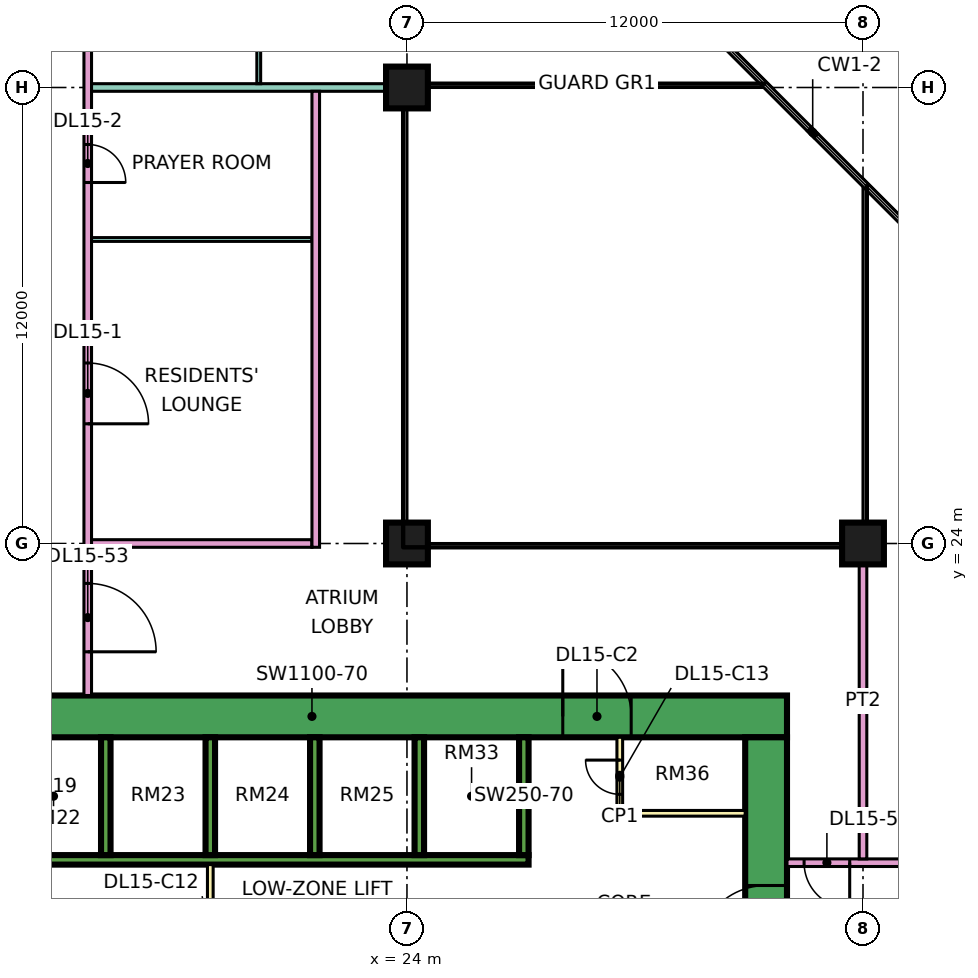
"""IFC4 building model, lengths in metres.
Left out: names, types, materials, properties, quantities, classifications, styles, units other than length and angle.
Written with IfcOpenShell. Run it as: python <this file> out.ifc"""

import sys

from ifc_helpers import new_model, si_unit, direction, frame, frame_2d, origin, origin_2d, place, context, subcontext, project, spatial, rectangle, extrude, element, fill, save


model = new_model("IFC4")
c1 = context("Model", 3, precision=1e-05, world=origin(), true_north=direction((0.0, 1.0)))
c2 = subcontext(c1, "Body", "Model", "MODEL_VIEW")
j1 = project(units=[si_unit("LENGTHUNIT", "METRE"), si_unit("PLANEANGLEUNIT", "RADIAN")], contexts=[c1])
p1 = place(None, origin())
s1 = spatial("IfcSite", under=j1, at=p1, CompositionType="ELEMENT")
p2 = place(p1, origin())
s2 = spatial("IfcBuilding", under=s1, at=p2, CompositionType="ELEMENT")
p3 = place(p2, frame((0.0, 0.0, 71.4)))
s3 = spatial("IfcBuildingStorey", under=s2, at=p3, CompositionType="ELEMENT", Elevation=71.4)
for number, where, z_axis, x_axis in (
    (1, (24.0, 24.0, 0.0), (0.0, 0.0, 1.0), (1.0, 0.0, 0.0)),
    (2, (24.0, 36.0, 0.0), (0.0, 0.0, 1.0), (1.0, 0.0, 0.0)),
    (3, (36.0, 24.0, 0.0), (0.0, 0.0, 1.0), (1.0, 0.0, 0.0)),
):
    element("IfcColumn", number, at=place(p3, frame(where, z_axis=z_axis, x_axis=x_axis)), inside=s3, PredefinedType="COLUMN", context=c2, shape_type="SweptSolid", body=[
        extrude(rectangle(XDim=1.1, YDim=1.1, at=origin_2d()), origin(), (0.0, 0.0, 1.0), 3.75),
    ])
p4 = place(p3, frame((9.0, 19.45, 0.0), z_axis=(0.0, 0.0, 1.0), x_axis=(1.0, 0.0, 0.0)))
e4 = element("IfcWall", 4, at=p4, inside=s3, PredefinedType="SHEAR", context=c2, shape_type="SweptSolid", body=[
    extrude(rectangle(XDim=25.0, YDim=1.1, at=frame_2d((12.5, 0.0))), origin(), (0.0, 0.0, 1.0), 3.75),
])
p5 = place(p4, frame((19.1, 0.0, 0.0)))
e5 = element("IfcOpeningElement", 5, at=p5, cuts=e4, PredefinedType="OPENING", context=c2, shape_type="SweptSolid", body=[
    extrude(rectangle(XDim=1.8, YDim=2.4, at=frame_2d((0.9, 1.2))), frame((0.0, 0.56, 0.0), z_axis=(0.0, -1.0, 0.0), x_axis=(1.0, 0.0, 0.0)), (0.0, 0.0, 1.0), 1.12),
])
p6 = place(p3, frame((33.45, 8.1, 0.0), z_axis=(0.0, 0.0, 1.0), x_axis=(0.0, 1.0, 0.0)))
e6 = element("IfcWall", 6, at=p6, inside=s3, PredefinedType="SHEAR", context=c2, shape_type="SweptSolid", body=[
    extrude(rectangle(XDim=10.8, YDim=1.1, at=frame_2d((5.4, 0.0))), origin(), (0.0, 0.0, 1.0), 3.75),
])
p7 = place(p6, frame((5.1, 0.0, 0.0)))
e7 = element("IfcOpeningElement", 7, at=p7, cuts=e6, PredefinedType="OPENING", context=c2, shape_type="SweptSolid", body=[
    extrude(rectangle(XDim=1.8, YDim=2.4, at=frame_2d((0.9, 1.2))), frame((0.0, 0.56, 0.0), z_axis=(0.0, -1.0, 0.0), x_axis=(1.0, 0.0, 0.0)), (0.0, 0.0, 1.0), 1.12),
])
p8 = place(p3, frame((13.45, 15.675, 0.0), z_axis=(0.0, 0.0, 1.0), x_axis=(1.0, 0.0, 0.0)))
e8 = element("IfcWall", 8, at=p8, inside=s3, PredefinedType="SHEAR", context=c2, shape_type="SweptSolid", body=[
    extrude(rectangle(XDim=13.75, YDim=0.25, at=frame_2d((6.875, 0.0))), origin(), (0.0, 0.0, 1.0), 3.75),
])
for number, where, z_axis, x_axis in (
    (9, (16.075, 15.8, 0.0), (0.0, 0.0, 1.0), (0.0, 1.0, 0.0)),
    (10, (18.825, 15.8, 0.0), (0.0, 0.0, 1.0), (0.0, 1.0, 0.0)),
    (11, (21.575, 15.8, 0.0), (0.0, 0.0, 1.0), (0.0, 1.0, 0.0)),
    (12, (24.325, 15.8, 0.0), (0.0, 0.0, 1.0), (0.0, 1.0, 0.0)),
    (13, (27.075, 15.8, 0.0), (0.0, 0.0, 1.0), (0.0, 1.0, 0.0)),
):
    element("IfcWall", number, at=place(p3, frame(where, z_axis=z_axis, x_axis=x_axis)), inside=s3, PredefinedType="SHEAR", context=c2, shape_type="SweptSolid", body=[
        extrude(rectangle(XDim=3.1, YDim=0.25, at=frame_2d((1.55, 0.0))), origin(), (0.0, 0.0, 1.0), 3.75),
    ])
p9 = place(p3, frame((18.825, 11.45, 0.0), z_axis=(0.0, 0.0, 1.0), x_axis=(0.0, 1.0, 0.0)))
e14 = element("IfcWall", 14, at=p9, inside=s3, PredefinedType="PARTITIONING", context=c2, shape_type="SweptSolid", body=[
    extrude(rectangle(XDim=4.1, YDim=0.15, at=frame_2d((2.05, 0.0))), origin(), (0.0, 0.0, 1.0), 3.35),
])
p10 = place(p9, frame((1.15, 0.0, 0.0)))
e15 = element("IfcOpeningElement", 15, at=p10, cuts=e14, PredefinedType="OPENING", context=c2, shape_type="SweptSolid", body=[
    extrude(rectangle(XDim=1.8, YDim=2.4, at=frame_2d((0.9, 1.2))), frame((0.0, 0.085, 0.0), z_axis=(0.0, -1.0, 0.0), x_axis=(1.0, 0.0, 0.0)), (0.0, 0.0, 1.0), 0.17),
])
p11 = place(p3, frame((29.6, 16.9, 0.0), z_axis=(0.0, 0.0, 1.0), x_axis=(0.0, 1.0, 0.0)))
e16 = element("IfcWall", 16, at=p11, inside=s3, PredefinedType="PARTITIONING", context=c2, shape_type="SweptSolid", body=[
    extrude(rectangle(XDim=2.0, YDim=0.15, at=frame_2d((1.0, 0.0))), origin(), (0.0, 0.0, 1.0), 3.35),
])
p12 = place(p11, frame((0.5, 0.0, 0.0)))
e17 = element("IfcOpeningElement", 17, at=p12, cuts=e16, PredefinedType="OPENING", context=c2, shape_type="SweptSolid", body=[
    extrude(rectangle(XDim=0.9, YDim=2.1, at=frame_2d((0.45, 1.05))), frame((0.0, 0.085, 0.0), z_axis=(0.0, -1.0, 0.0), x_axis=(1.0, 0.0, 0.0)), (0.0, 0.0, 1.0), 0.17),
])
p13 = place(p3, frame((29.6, 16.9, 0.0), z_axis=(0.0, 0.0, 1.0), x_axis=(1.0, 0.0, 0.0)))
e18 = element("IfcWall", 18, at=p13, inside=s3, PredefinedType="PARTITIONING", context=c2, shape_type="SweptSolid", body=[
    extrude(rectangle(XDim=3.3, YDim=0.15, at=frame_2d((1.65, 0.0))), origin(), (0.0, 0.0, 1.0), 3.35),
])
p14 = place(p3, frame((15.6, 20.0, 0.0), z_axis=(0.0, 0.0, 1.0), x_axis=(0.0, 1.0, 0.0)))
e19 = element("IfcWall", 19, at=p14, inside=s3, PredefinedType="PARTITIONING", context=c2, shape_type="SweptSolid", body=[
    extrude(rectangle(XDim=27.775, YDim=0.2, at=frame_2d((13.887, 0.0))), origin(), (0.0, 0.0, 1.0), 3.35),
])
p15 = place(p14, frame((7.15, 0.0, 0.0)))
e20 = element("IfcOpeningElement", 20, at=p15, cuts=e19, PredefinedType="OPENING", context=c2, shape_type="SweptSolid", body=[
    extrude(rectangle(XDim=1.6, YDim=2.1, at=frame_2d((0.8, 1.05))), frame((0.0, 0.11, 0.0), z_axis=(0.0, -1.0, 0.0), x_axis=(1.0, 0.0, 0.0)), (0.0, 0.0, 1.0), 0.22),
])
p16 = place(p14, frame((13.5, 0.0, 0.0)))
e21 = element("IfcOpeningElement", 21, at=p16, cuts=e19, PredefinedType="OPENING", context=c2, shape_type="SweptSolid", body=[
    extrude(rectangle(XDim=1.0, YDim=2.1, at=frame_2d((0.5, 1.05))), frame((0.0, 0.11, 0.0), z_axis=(0.0, -1.0, 0.0), x_axis=(1.0, 0.0, 0.0)), (0.0, 0.0, 1.0), 0.22),
])
p17 = place(p14, frame((17.35, 0.0, 0.0)))
e22 = element("IfcOpeningElement", 22, at=p17, cuts=e19, PredefinedType="OPENING", context=c2, shape_type="SweptSolid", body=[
    extrude(rectangle(XDim=1.0, YDim=2.1, at=frame_2d((0.5, 1.05))), frame((0.0, 0.11, 0.0), z_axis=(0.0, -1.0, 0.0), x_axis=(1.0, 0.0, 0.0)), (0.0, 0.0, 1.0), 0.22),
])
p18 = place(p14, frame((1.15, 0.0, 0.0)))
e23 = element("IfcOpeningElement", 23, at=p18, cuts=e19, PredefinedType="OPENING", context=c2, shape_type="SweptSolid", body=[
    extrude(rectangle(XDim=1.8, YDim=2.1, at=frame_2d((0.9, 1.05))), frame((0.0, 0.11, 0.0), z_axis=(0.0, -1.0, 0.0), x_axis=(1.0, 0.0, 0.0)), (0.0, 0.0, 1.0), 0.22),
])
p19 = place(p14, frame((25.9, 0.0, 0.0)))
e24 = element("IfcOpeningElement", 24, at=p19, cuts=e19, PredefinedType="OPENING", context=c2, shape_type="SweptSolid", body=[
    extrude(rectangle(XDim=1.0, YDim=2.1, at=frame_2d((0.5, 1.05))), frame((0.0, 0.11, 0.0), z_axis=(0.0, -1.0, 0.0), x_axis=(1.0, 0.0, 0.0)), (0.0, 0.0, 1.0), 0.22),
])
p20 = place(p3, frame((15.7, 24.0, 0.0), z_axis=(0.0, 0.0, 1.0), x_axis=(1.0, 0.0, 0.0)))
e25 = element("IfcWall", 25, at=p20, inside=s3, PredefinedType="PARTITIONING", context=c2, shape_type="SweptSolid", body=[
    extrude(rectangle(XDim=5.8, YDim=0.2, at=frame_2d((2.9, 0.0))), origin(), (0.0, 0.0, 1.0), 3.35),
])
p21 = place(p3, frame((15.7, 32.0, 0.0), z_axis=(0.0, 0.0, 1.0), x_axis=(1.0, 0.0, 0.0)))
e26 = element("IfcWall", 26, at=p21, inside=s3, PredefinedType="PARTITIONING", context=c2, shape_type="SweptSolid", body=[
    extrude(rectangle(XDim=5.8, YDim=0.1, at=frame_2d((2.9, 0.0))), origin(), (0.0, 0.0, 1.0), 3.35),
])
p22 = place(p3, frame((15.7, 36.0, 0.0), z_axis=(0.0, 0.0, 1.0), x_axis=(1.0, 0.0, 0.0)))
e27 = element("IfcWall", 27, at=p22, inside=s3, PredefinedType="PARTITIONING", context=c2, shape_type="SweptSolid", body=[
    extrude(rectangle(XDim=8.3, YDim=0.2, at=frame_2d((4.15, 0.0))), origin(), (0.0, 0.0, 1.0), 3.35),
])
p23 = place(p3, frame((20.1, 36.1, 0.0), z_axis=(0.0, 0.0, 1.0), x_axis=(0.0, 1.0, 0.0)))
e28 = element("IfcWall", 28, at=p23, inside=s3, PredefinedType="PARTITIONING", context=c2, shape_type="SweptSolid", body=[
    extrude(rectangle(XDim=2.85, YDim=0.1, at=frame_2d((1.425, 0.0))), origin(), (0.0, 0.0, 1.0), 3.35),
])
p24 = place(p23, frame((0.95, 0.0, 0.0)))
e29 = element("IfcOpeningElement", 29, at=p24, cuts=e28, PredefinedType="OPENING", context=c2, shape_type="SweptSolid", body=[
    extrude(rectangle(XDim=0.9, YDim=2.1, at=frame_2d((0.45, 1.05))), frame((0.0, 0.06, 0.0), z_axis=(0.0, -1.0, 0.0), x_axis=(1.0, 0.0, 0.0)), (0.0, 0.0, 1.0), 0.12),
])
p25 = place(p3, frame((21.6, 23.9, 0.0), z_axis=(0.0, 0.0, 1.0), x_axis=(0.0, 1.0, 0.0)))
e30 = element("IfcWall", 30, at=p25, inside=s3, PredefinedType="PARTITIONING", context=c2, shape_type="SweptSolid", body=[
    extrude(rectangle(XDim=12.0, YDim=0.2, at=frame_2d((6.0, 0.0))), origin(), (0.0, 0.0, 1.0), 3.35),
])
p26 = place(p3, frame((34.0, 15.6, 0.0), z_axis=(0.0, 0.0, 1.0), x_axis=(1.0, 0.0, 0.0)))
e31 = element("IfcWall", 31, at=p26, inside=s3, PredefinedType="PARTITIONING", context=c2, shape_type="SweptSolid", body=[
    extrude(rectangle(XDim=10.35, YDim=0.2, at=frame_2d((5.175, 0.0))), origin(), (0.0, 0.0, 1.0), 3.35),
])
p27 = place(p26, frame((5.6, 0.0, 0.0)))
e32 = element("IfcOpeningElement", 32, at=p27, cuts=e31, PredefinedType="OPENING", context=c2, shape_type="SweptSolid", body=[
    extrude(rectangle(XDim=1.0, YDim=2.1, at=frame_2d((0.5, 1.05))), frame((0.0, 0.11, 0.0), z_axis=(0.0, -1.0, 0.0), x_axis=(1.0, 0.0, 0.0)), (0.0, 0.0, 1.0), 0.22),
])
p28 = place(p26, frame((0.45, 0.0, 0.0)))
e33 = element("IfcOpeningElement", 33, at=p28, cuts=e31, PredefinedType="OPENING", context=c2, shape_type="SweptSolid", body=[
    extrude(rectangle(XDim=1.2, YDim=2.1, at=frame_2d((0.6, 1.05))), frame((0.0, 0.11, 0.0), z_axis=(0.0, -1.0, 0.0), x_axis=(1.0, 0.0, 0.0)), (0.0, 0.0, 1.0), 0.22),
])
p29 = place(p3, frame((36.0, 15.7, 0.0), z_axis=(0.0, 0.0, 1.0), x_axis=(0.0, 1.0, 0.0)))
e34 = element("IfcWall", 34, at=p29, inside=s3, PredefinedType="PARTITIONING", context=c2, shape_type="SweptSolid", body=[
    extrude(rectangle(XDim=8.3, YDim=0.2, at=frame_2d((4.15, 0.0))), origin(), (0.0, 0.0, 1.0), 3.35),
])
p30 = place(p7, origin())
e35 = element("IfcDoor", 35, at=p30, inside=s3, OperationType="DOUBLE_DOOR_SINGLE_SWING", PredefinedType="DOOR", context=c2, shape_type="SweptSolid", body=[
    extrude(rectangle(XDim=1.8, YDim=2.4, at=frame_2d((0.9, 1.2))), frame((0.0, 0.025, 0.0), z_axis=(0.0, -1.0, 0.0), x_axis=(1.0, 0.0, 0.0)), (0.0, 0.0, 1.0), 0.05),
])
fill(e7, e35)
p31 = place(p5, origin())
e36 = element("IfcDoor", 36, at=p31, inside=s3, OperationType="DOUBLE_DOOR_SINGLE_SWING", PredefinedType="DOOR", context=c2, shape_type="SweptSolid", body=[
    extrude(rectangle(XDim=1.8, YDim=2.4, at=frame_2d((0.9, 1.2))), frame((0.0, 0.025, 0.0), z_axis=(0.0, -1.0, 0.0), x_axis=(1.0, 0.0, 0.0)), (0.0, 0.0, 1.0), 0.05),
])
fill(e5, e36)
p32 = place(p12, frame((0.9, 0.0, 0.0), z_axis=(0.0, 0.0, 1.0), x_axis=(-1.0, 0.0, 0.0)))
e37 = element("IfcDoor", 37, at=p32, inside=s3, OperationType="SINGLE_SWING_RIGHT", PredefinedType="DOOR", context=c2, shape_type="SweptSolid", body=[
    extrude(rectangle(XDim=0.9, YDim=2.1, at=frame_2d((0.45, 1.05))), frame((0.0, 0.025, 0.0), z_axis=(0.0, -1.0, 0.0), x_axis=(1.0, 0.0, 0.0)), (0.0, 0.0, 1.0), 0.05),
])
fill(e17, e37)
p33 = place(p15, frame((1.6, 0.0, 0.0), z_axis=(0.0, 0.0, 1.0), x_axis=(-1.0, 0.0, 0.0)))
e38 = element("IfcDoor", 38, at=p33, inside=s3, OperationType="DOUBLE_DOOR_SINGLE_SWING", PredefinedType="DOOR", context=c2, shape_type="SweptSolid", body=[
    extrude(rectangle(XDim=1.6, YDim=2.1, at=frame_2d((0.8, 1.05))), frame((0.0, 0.025, 0.0), z_axis=(0.0, -1.0, 0.0), x_axis=(1.0, 0.0, 0.0)), (0.0, 0.0, 1.0), 0.05),
])
fill(e20, e38)
p34 = place(p16, frame((1.0, 0.0, 0.0), z_axis=(0.0, 0.0, 1.0), x_axis=(-1.0, 0.0, 0.0)))
e39 = element("IfcDoor", 39, at=p34, inside=s3, OperationType="SINGLE_SWING_LEFT", PredefinedType="DOOR", context=c2, shape_type="SweptSolid", body=[
    extrude(rectangle(XDim=1.0, YDim=2.1, at=frame_2d((0.5, 1.05))), frame((0.0, 0.025, 0.0), z_axis=(0.0, -1.0, 0.0), x_axis=(1.0, 0.0, 0.0)), (0.0, 0.0, 1.0), 0.05),
])
fill(e21, e39)
p35 = place(p28, origin())
e40 = element("IfcDoor", 40, at=p35, inside=s3, OperationType="SINGLE_SWING_RIGHT", PredefinedType="DOOR", context=c2, shape_type="SweptSolid", body=[
    extrude(rectangle(XDim=1.2, YDim=2.1, at=frame_2d((0.6, 1.05))), frame((0.0, 0.025, 0.0), z_axis=(0.0, -1.0, 0.0), x_axis=(1.0, 0.0, 0.0)), (0.0, 0.0, 1.0), 0.05),
])
fill(e33, e40)
p36 = place(p18, frame((1.8, 0.0, 0.0), z_axis=(0.0, 0.0, 1.0), x_axis=(-1.0, 0.0, 0.0)))
e41 = element("IfcDoor", 41, at=p36, inside=s3, OperationType="DOUBLE_DOOR_SINGLE_SWING", PredefinedType="DOOR", context=c2, shape_type="SweptSolid", body=[
    extrude(rectangle(XDim=1.8, YDim=2.1, at=frame_2d((0.9, 1.05))), frame((0.0, 0.025, 0.0), z_axis=(0.0, -1.0, 0.0), x_axis=(1.0, 0.0, 0.0)), (0.0, 0.0, 1.0), 0.05),
])
fill(e23, e41)
save(model, sys.argv[1])
